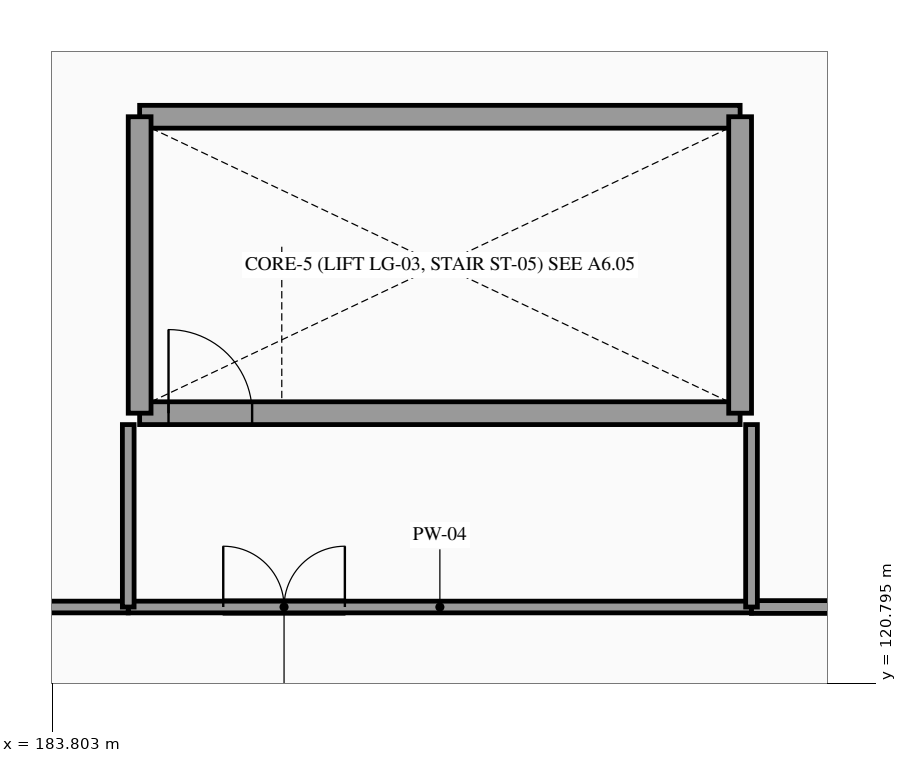
"""IFC4 building model, lengths in metres.
Left out: names, types, materials, properties, quantities, classifications, styles, units other than length and angle.
Written with IfcOpenShell. Run it as: python <this file> out.ifc"""

import sys

from ifc_helpers import new_model, si_unit, direction, frame, frame_2d, origin, place, context, subcontext, project, spatial, rectangle, extrude, element, fill, save


model = new_model("IFC4")
c1 = context("Model", 3, precision=1e-05, world=origin(), true_north=direction((0.0, 1.0)))
c2 = subcontext(c1, "Body", "Model", "MODEL_VIEW")
j1 = project(units=[si_unit("LENGTHUNIT", "METRE"), si_unit("PLANEANGLEUNIT", "RADIAN")], contexts=[c1])
p1 = place(None, origin())
s1 = spatial("IfcSite", under=j1, at=p1, CompositionType="ELEMENT")
p2 = place(p1, origin())
s2 = spatial("IfcBuilding", under=s1, at=p2, CompositionType="ELEMENT")
p3 = place(p2, frame((0.0, 0.0, 5.4)))
s3 = spatial("IfcBuildingStorey", under=s2, at=p3, CompositionType="ELEMENT", Elevation=5.4)
p4 = place(p3, frame((184.95, 124.35, 0.0), z_axis=(0.0, 0.0, 1.0), x_axis=(1.0, 0.0, 0.0)))
e1 = element("IfcWall", 1, at=p4, inside=s3, PredefinedType="SHEAR", context=c2, shape_type="SweptSolid", body=[
    extrude(rectangle(XDim=7.9, YDim=0.3, at=frame_2d((3.95, 0.0))), origin(), (0.0, 0.0, 1.0), 4.68),
])
p5 = place(p4, frame((0.38, 0.0, 0.0)))
e2 = element("IfcOpeningElement", 2, at=p5, cuts=e1, PredefinedType="OPENING", context=c2, shape_type="SweptSolid", body=[
    extrude(rectangle(XDim=1.1, YDim=2.2, at=frame_2d((0.55, 1.1))), frame((0.0, 0.16, 0.0), z_axis=(0.0, -1.0, 0.0), x_axis=(1.0, 0.0, 0.0)), (0.0, 0.0, 1.0), 0.32),
])
p6 = place(p3, frame((184.95, 128.25, 0.0), z_axis=(0.0, 0.0, 1.0), x_axis=(1.0, 0.0, 0.0)))
e3 = element("IfcWall", 3, at=p6, inside=s3, PredefinedType="SHEAR", context=c2, shape_type="SweptSolid", body=[
    extrude(rectangle(XDim=7.9, YDim=0.3, at=frame_2d((3.95, 0.0))), origin(), (0.0, 0.0, 1.0), 4.68),
])
for number, where, z_axis, x_axis in (
    (4, (184.95, 124.35, 0.0), (0.0, 0.0, 1.0), (0.0, 1.0, 0.0)),
    (5, (192.85, 124.35, 0.0), (0.0, 0.0, 1.0), (0.0, 1.0, 0.0)),
):
    element("IfcWall", number, at=place(p3, frame(where, z_axis=z_axis, x_axis=x_axis)), inside=s3, PredefinedType="SHEAR", context=c2, shape_type="SweptSolid", body=[
        extrude(rectangle(XDim=3.9, YDim=0.3, at=frame_2d((1.95, 0.0))), origin(), (0.0, 0.0, 1.0), 4.68),
    ])
p7 = place(p3, frame((184.8, 121.8, 0.0), z_axis=(0.0, 0.0, 1.0), x_axis=(1.0, 0.0, 0.0)))
e6 = element("IfcWall", 6, at=p7, inside=s3, PredefinedType="PARTITIONING", context=c2, shape_type="SweptSolid", body=[
    extrude(rectangle(XDim=8.2, YDim=0.154, at=frame_2d((4.1, 0.0))), origin(), (0.0, 0.0, 1.0), 3.23),
])
p8 = place(p7, frame((1.25, 0.0, 0.0)))
e7 = element("IfcOpeningElement", 7, at=p8, cuts=e6, PredefinedType="OPENING", context=c2, shape_type="SweptSolid", body=[
    extrude(rectangle(XDim=1.6, YDim=2.2, at=frame_2d((0.8, 1.1))), frame((0.0, 0.087, 0.0), z_axis=(0.0, -1.0, 0.0), x_axis=(1.0, 0.0, 0.0)), (0.0, 0.0, 1.0), 0.174),
])
p9 = place(p3, frame((180.02, 121.8, 0.0), z_axis=(0.0, 0.0, 1.0), x_axis=(1.0, 0.0, 0.0)))
e8 = element("IfcWall", 8, at=p9, inside=s3, PredefinedType="PARTITIONING", context=c2, shape_type="SweptSolid", body=[
    extrude(rectangle(XDim=4.78, YDim=0.154, at=frame_2d((2.39, 0.0))), origin(), (0.0, 0.0, 1.0), 3.23),
])
p10 = place(p3, frame((184.8, 121.8, 0.0), z_axis=(0.0, 0.0, 1.0), x_axis=(0.0, 1.0, 0.0)))
e9 = element("IfcWall", 9, at=p10, inside=s3, PredefinedType="PARTITIONING", context=c2, shape_type="SweptSolid", body=[
    extrude(rectangle(XDim=2.4, YDim=0.154, at=frame_2d((1.2, 0.0))), origin(), (0.0, 0.0, 1.0), 3.23),
])
p11 = place(p3, frame((193.0, 121.8, 0.0), z_axis=(0.0, 0.0, 1.0), x_axis=(1.0, 0.0, 0.0)))
e10 = element("IfcWall", 10, at=p11, inside=s3, PredefinedType="PARTITIONING", context=c2, shape_type="SweptSolid", body=[
    extrude(rectangle(XDim=1.4, YDim=0.168, at=frame_2d((0.7, 0.0))), origin(), (0.0, 0.0, 1.0), 3.23),
])
p12 = place(p3, frame((193.0, 121.8, 0.0), z_axis=(0.0, 0.0, 1.0), x_axis=(0.0, 1.0, 0.0)))
e11 = element("IfcWall", 11, at=p12, inside=s3, PredefinedType="PARTITIONING", context=c2, shape_type="SweptSolid", body=[
    extrude(rectangle(XDim=2.4, YDim=0.154, at=frame_2d((1.2, 0.0))), origin(), (0.0, 0.0, 1.0), 3.23),
])
p13 = place(p5, frame((1.1, 0.0, 0.0), z_axis=(0.0, 0.0, 1.0), x_axis=(-1.0, 0.0, 0.0)))
e12 = element("IfcDoor", 12, at=p13, inside=s3, OperationType="SINGLE_SWING_LEFT", PredefinedType="DOOR", context=c2, shape_type="SweptSolid", body=[
    extrude(rectangle(XDim=1.1, YDim=2.2, at=frame_2d((0.55, 1.1))), frame((0.0, 0.025, 0.0), z_axis=(0.0, -1.0, 0.0), x_axis=(1.0, 0.0, 0.0)), (0.0, 0.0, 1.0), 0.05),
])
fill(e2, e12)
p14 = place(p8, origin())
e13 = element("IfcDoor", 13, at=p14, inside=s3, OperationType="DOUBLE_DOOR_SINGLE_SWING", PredefinedType="DOOR", context=c2, shape_type="SweptSolid", body=[
    extrude(rectangle(XDim=1.6, YDim=2.2, at=frame_2d((0.8, 1.1))), frame((0.0, 0.025, 0.0), z_axis=(0.0, -1.0, 0.0), x_axis=(1.0, 0.0, 0.0)), (0.0, 0.0, 1.0), 0.05),
])
fill(e7, e13)
save(model, sys.argv[1])
